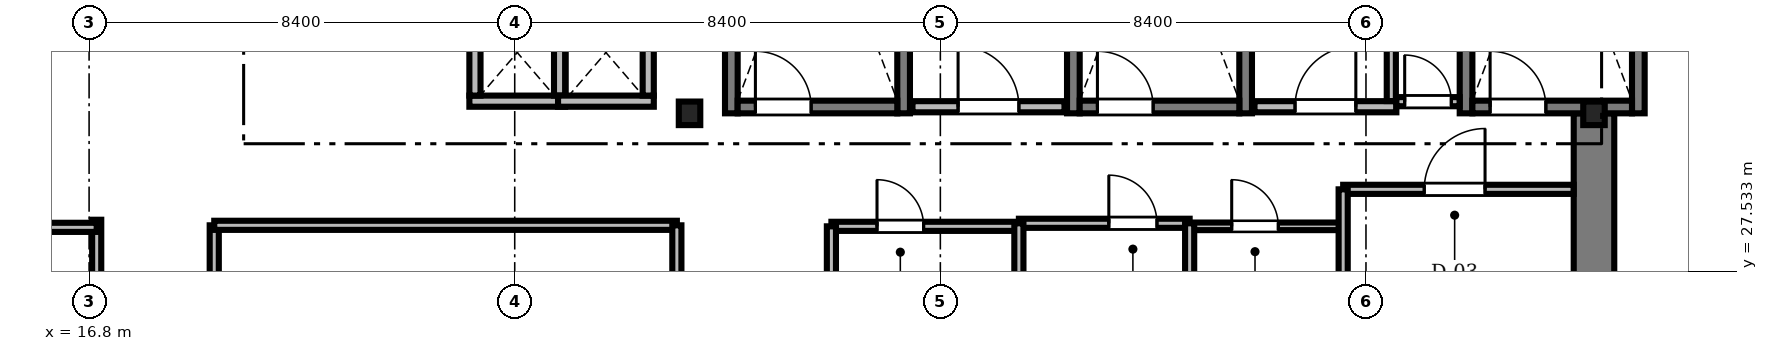
"""IFC4 building model, lengths in metres.
Left out: names, types, materials, properties, quantities, classifications, styles, units other than length and angle.
Written with IfcOpenShell. Run it as: python <this file> out.ifc"""

import sys

from ifc_helpers import new_model, si_unit, direction, frame, frame_2d, origin, origin_2d, place, context, subcontext, project, spatial, rectangle, i_section, extrude, source, transform, mapped, element, fill, save


model = new_model("IFC4")
c1 = context("Model", 3, precision=1e-05, world=origin(), true_north=direction((0.0, 1.0)))
c2 = subcontext(c1, "Body", "Model", "MODEL_VIEW")
j1 = project(units=[si_unit("LENGTHUNIT", "METRE"), si_unit("PLANEANGLEUNIT", "RADIAN")], contexts=[c1])
p1 = place(None, origin())
s1 = spatial("IfcSite", under=j1, at=p1, CompositionType="ELEMENT")
p2 = place(p1, origin())
s2 = spatial("IfcBuilding", under=s1, at=p2, CompositionType="ELEMENT")
p3 = place(p2, frame((0.0, 0.0, 159.4)))
s3 = spatial("IfcBuildingStorey", under=s2, at=p3, CompositionType="ELEMENT", Elevation=159.4)
m1 = source(origin(), c2, "Body", "SweptSolid", [
    extrude(rectangle(XDim=13.15, YDim=0.8, at=frame_2d((6.575, 0.0))), origin(), (0.0, 0.0, 1.0), 3.46),
])
p4 = place(p3, frame((46.5, 17.5, 0.0), z_axis=(0.0, 0.0, 1.0), x_axis=(0.0, 1.0, 0.0)))
e1 = element("IfcWall", 1, at=p4, inside=s3, PredefinedType="SHEAR", context=c2, shape_type="MappedRepresentation", body=[
    mapped(m1, transform((0.0, 0.0, 0.0), scale=1.0)),
])
m2 = source(origin(), c2, "Body", "SweptSolid", [
    extrude(i_section(OverallWidth=0.424, OverallDepth=0.465, WebThickness=0.035, FlangeThickness=0.056, FilletRadius=0.015, at=origin_2d()), origin(), (0.0, 0.0, 1.0), 3.46),
])
for number, where, z_axis, x_axis in (
    (2, (28.65, 30.65, 0.0), (0.0, 0.0, 1.0), (1.0, 0.0, 0.0)),
    (3, (46.5, 30.65, 0.0), (0.0, 0.0, 1.0), (1.0, 0.0, 0.0)),
):
    element("IfcColumn", number, at=place(p3, frame(where, z_axis=z_axis, x_axis=x_axis)), inside=s3, PredefinedType="COLUMN", context=c2, shape_type="MappedRepresentation", body=[
        mapped(m2, transform((0.0, 0.0, 0.0), scale=1.0)),
    ])
m3 = source(origin(), c2, "Body", "SweptSolid", [
    extrude(rectangle(XDim=9.25, YDim=0.25, at=frame_2d((4.625, 0.0))), origin(), (0.0, 0.0, 1.0), 3.5),
])
for number, where, z_axis, x_axis in (
    (4, (29.475, 30.65, 0.0), (0.0, 0.0, 1.0), (0.0, 1.0, 0.0)),
    (5, (32.875, 30.65, 0.0), (0.0, 0.0, 1.0), (0.0, 1.0, 0.0)),
):
    element("IfcWall", number, at=place(p3, frame(where, z_axis=z_axis, x_axis=x_axis)), inside=s3, PredefinedType="SOLIDWALL", context=c2, shape_type="MappedRepresentation", body=[
        mapped(m3, transform((0.0, 0.0, 0.0), scale=1.0)),
    ])
m4 = source(origin(), c2, "Body", "SweptSolid", [
    extrude(rectangle(XDim=3.15, YDim=0.25, at=frame_2d((1.575, 0.0))), origin(), (0.0, 0.0, 1.0), 3.5),
])
p5 = place(p3, frame((29.6, 30.775, 0.0), z_axis=(0.0, 0.0, 1.0), x_axis=(1.0, 0.0, 0.0)))
e6 = element("IfcWall", 6, at=p5, inside=s3, PredefinedType="SOLIDWALL", context=c2, shape_type="MappedRepresentation", body=[
    mapped(m4, transform((0.0, 0.0, 0.0), scale=1.0)),
])
m5 = source(origin(), c2, "Body", "SweptSolid", [
    extrude(rectangle(XDim=1.1, YDim=2.2, at=frame_2d((0.55, 1.1))), frame((0.0, 0.135, 0.0), z_axis=(0.0, -1.0, 0.0), x_axis=(1.0, 0.0, 0.0)), (0.0, 0.0, 1.0), 0.27),
])
p6 = place(p5, frame((0.35, 0.0, 0.0)))
e7 = element("IfcOpeningElement", 7, at=p6, cuts=e6, PredefinedType="OPENING", context=c2, shape_type="MappedRepresentation", body=[
    mapped(m5, transform((0.0, 0.0, 0.0), scale=1.0)),
])
for number, where, z_axis, x_axis in (
    (8, (36.225, 30.65, 0.0), (0.0, 0.0, 1.0), (0.0, 1.0, 0.0)),
    (9, (39.625, 30.65, 0.0), (0.0, 0.0, 1.0), (0.0, 1.0, 0.0)),
):
    element("IfcWall", number, at=place(p3, frame(where, z_axis=z_axis, x_axis=x_axis)), inside=s3, PredefinedType="SOLIDWALL", context=c2, shape_type="MappedRepresentation", body=[
        mapped(m3, transform((0.0, 0.0, 0.0), scale=1.0)),
    ])
p7 = place(p3, frame((36.35, 30.775, 0.0), z_axis=(0.0, 0.0, 1.0), x_axis=(1.0, 0.0, 0.0)))
e10 = element("IfcWall", 10, at=p7, inside=s3, PredefinedType="SOLIDWALL", context=c2, shape_type="MappedRepresentation", body=[
    mapped(m4, transform((0.0, 0.0, 0.0), scale=1.0)),
])
p8 = place(p7, frame((0.35, 0.0, 0.0)))
e11 = element("IfcOpeningElement", 11, at=p8, cuts=e10, PredefinedType="OPENING", context=c2, shape_type="MappedRepresentation", body=[
    mapped(m5, transform((0.0, 0.0, 0.0), scale=1.0)),
])
for number, where, z_axis, x_axis in (
    (12, (43.975, 30.65, 0.0), (0.0, 0.0, 1.0), (0.0, 1.0, 0.0)),
    (13, (47.375, 30.65, 0.0), (0.0, 0.0, 1.0), (0.0, 1.0, 0.0)),
):
    element("IfcWall", number, at=place(p3, frame(where, z_axis=z_axis, x_axis=x_axis)), inside=s3, PredefinedType="SOLIDWALL", context=c2, shape_type="MappedRepresentation", body=[
        mapped(m3, transform((0.0, 0.0, 0.0), scale=1.0)),
    ])
p9 = place(p3, frame((44.1, 30.775, 0.0), z_axis=(0.0, 0.0, 1.0), x_axis=(1.0, 0.0, 0.0)))
e14 = element("IfcWall", 14, at=p9, inside=s3, PredefinedType="SOLIDWALL", context=c2, shape_type="MappedRepresentation", body=[
    mapped(m4, transform((0.0, 0.0, 0.0), scale=1.0)),
])
p10 = place(p9, frame((0.35, 0.0, 0.0)))
e15 = element("IfcOpeningElement", 15, at=p10, cuts=e14, PredefinedType="OPENING", context=c2, shape_type="MappedRepresentation", body=[
    mapped(m5, transform((0.0, 0.0, 0.0), scale=1.0)),
])
m6 = source(origin(), c2, "Body", "SweptSolid", [
    extrude(rectangle(XDim=3.0, YDim=0.22, at=frame_2d((1.5, 0.0))), origin(), (0.0, 0.0, 1.0), 3.46),
])
p11 = place(p3, frame((33.05, 30.78, 0.0), z_axis=(0.0, 0.0, 1.0), x_axis=(1.0, 0.0, 0.0)))
e16 = element("IfcWall", 16, at=p11, inside=s3, PredefinedType="SOLIDWALL", context=c2, shape_type="MappedRepresentation", body=[
    mapped(m6, transform((0.0, 0.0, 0.0), scale=1.0)),
])
m7 = source(origin(), c2, "Body", "SweptSolid", [
    extrude(rectangle(XDim=1.2, YDim=2.2, at=frame_2d((0.6, 1.1))), frame((0.0, 0.12, 0.0), z_axis=(0.0, -1.0, 0.0), x_axis=(1.0, 0.0, 0.0)), (0.0, 0.0, 1.0), 0.24),
])
p12 = place(p11, frame((0.9, 0.0, 0.0)))
e17 = element("IfcOpeningElement", 17, at=p12, cuts=e16, PredefinedType="OPENING", context=c2, shape_type="MappedRepresentation", body=[
    mapped(m7, transform((0.0, 0.0, 0.0), scale=1.0)),
])
m8 = source(origin(), c2, "Body", "SweptSolid", [
    extrude(rectangle(XDim=2.8, YDim=0.22, at=frame_2d((1.4, 0.0))), origin(), (0.0, 0.0, 1.0), 3.46),
])
p13 = place(p3, frame((39.8, 30.78, 0.0), z_axis=(0.0, 0.0, 1.0), x_axis=(1.0, 0.0, 0.0)))
e18 = element("IfcWall", 18, at=p13, inside=s3, PredefinedType="SOLIDWALL", context=c2, shape_type="MappedRepresentation", body=[
    mapped(m8, transform((0.0, 0.0, 0.0), scale=1.0)),
])
p14 = place(p13, frame((0.8, 0.0, 0.0)))
e19 = element("IfcOpeningElement", 19, at=p14, cuts=e18, PredefinedType="OPENING", context=c2, shape_type="MappedRepresentation", body=[
    mapped(m7, transform((0.0, 0.0, 0.0), scale=1.0)),
])
m9 = source(origin(), c2, "Body", "SweptSolid", [
    extrude(rectangle(XDim=1.89, YDim=0.22, at=frame_2d((0.945, 0.0))), origin(), (0.0, 0.0, 1.0), 3.46),
])
p15 = place(p3, frame((24.305, 30.89, 0.0), z_axis=(0.0, 0.0, 1.0), x_axis=(1.0, 0.0, 0.0)))
e20 = element("IfcWall", 20, at=p15, inside=s3, PredefinedType="SOLIDWALL", context=c2, shape_type="MappedRepresentation", body=[
    mapped(m9, transform((0.0, 0.0, 0.0), scale=1.0)),
])
m10 = source(origin(), c2, "Body", "SweptSolid", [
    extrude(rectangle(XDim=1.7, YDim=0.22, at=frame_2d((0.85, 0.0))), origin(), (0.0, 0.0, 1.0), 3.46),
])
for number, where, z_axis, x_axis in (
    (21, (24.415, 31.0, 0.0), (0.0, 0.0, 1.0), (0.0, 1.0, 0.0)),
    (22, (26.085, 31.0, 0.0), (0.0, 0.0, 1.0), (0.0, 1.0, 0.0)),
):
    element("IfcWall", number, at=place(p3, frame(where, z_axis=z_axis, x_axis=x_axis)), inside=s3, PredefinedType="SOLIDWALL", context=c2, shape_type="MappedRepresentation", body=[
        mapped(m10, transform((0.0, 0.0, 0.0), scale=1.0)),
    ])
p16 = place(p3, frame((26.055, 30.89, 0.0), z_axis=(0.0, 0.0, 1.0), x_axis=(1.0, 0.0, 0.0)))
e23 = element("IfcWall", 23, at=p16, inside=s3, PredefinedType="SOLIDWALL", context=c2, shape_type="MappedRepresentation", body=[
    mapped(m9, transform((0.0, 0.0, 0.0), scale=1.0)),
])
p17 = place(p3, frame((27.835, 31.0, 0.0), z_axis=(0.0, 0.0, 1.0), x_axis=(0.0, 1.0, 0.0)))
e24 = element("IfcWall", 24, at=p17, inside=s3, PredefinedType="SOLIDWALL", context=c2, shape_type="MappedRepresentation", body=[
    mapped(m10, transform((0.0, 0.0, 0.0), scale=1.0)),
])
m11 = source(origin(), c2, "Body", "SweptSolid", [
    extrude(rectangle(XDim=4.548, YDim=0.18, at=frame_2d((2.274, 0.0))), origin(), (0.0, 0.0, 1.0), 3.092),
])
p18 = place(p3, frame((41.55, 29.15, 0.0), z_axis=(0.0, 0.0, 1.0), x_axis=(1.0, 0.0, 0.0)))
e25 = element("IfcWall", 25, at=p18, inside=s3, PredefinedType="PARTITIONING", context=c2, shape_type="MappedRepresentation", body=[
    mapped(m11, transform((0.0, 0.0, 0.0), scale=1.0)),
])
m12 = source(origin(), c2, "Body", "SweptSolid", [
    extrude(rectangle(XDim=1.2, YDim=2.2, at=frame_2d((0.6, 1.1))), frame((0.0, 0.1, 0.0), z_axis=(0.0, -1.0, 0.0), x_axis=(1.0, 0.0, 0.0)), (0.0, 0.0, 1.0), 0.2),
])
p19 = place(p18, frame((1.6, 0.0, 0.0)))
e26 = element("IfcOpeningElement", 26, at=p19, cuts=e25, PredefinedType="OPENING", context=c2, shape_type="MappedRepresentation", body=[
    mapped(m12, transform((0.0, 0.0, 0.0), scale=1.0)),
])
m13 = source(origin(), c2, "Body", "SweptSolid", [
    extrude(rectangle(XDim=4.24, YDim=0.18, at=frame_2d((2.12, 0.0))), origin(), (0.0, 0.0, 1.0), 2.852),
])
p20 = place(p3, frame((19.27, 24.2, 0.0), z_axis=(0.0, 0.0, 1.0), x_axis=(0.0, 1.0, 0.0)))
e27 = element("IfcWall", 27, at=p20, inside=s3, PredefinedType="PARTITIONING", context=c2, shape_type="MappedRepresentation", body=[
    mapped(m13, transform((0.0, 0.0, 0.0), scale=1.0)),
])
m14 = source(origin(), c2, "Body", "SweptSolid", [
    extrude(rectangle(XDim=1.05, YDim=2.2, at=frame_2d((0.525, 1.1))), frame((0.0, 0.1, 0.0), z_axis=(0.0, -1.0, 0.0), x_axis=(1.0, 0.0, 0.0)), (0.0, 0.0, 1.0), 0.2),
])
p21 = place(p20, frame((1.4, 0.0, 0.0)))
e28 = element("IfcOpeningElement", 28, at=p21, cuts=e27, PredefinedType="OPENING", context=c2, shape_type="MappedRepresentation", body=[
    mapped(m14, transform((0.0, 0.0, 0.0), scale=1.0)),
])
m15 = source(origin(), c2, "Body", "SweptSolid", [
    extrude(rectangle(XDim=3.7, YDim=0.18, at=frame_2d((1.85, 0.0))), origin(), (0.0, 0.0, 1.0), 3.092),
])
p22 = place(p3, frame((31.45, 28.42, 0.0), z_axis=(0.0, 0.0, 1.0), x_axis=(1.0, 0.0, 0.0)))
e29 = element("IfcWall", 29, at=p22, inside=s3, PredefinedType="PARTITIONING", context=c2, shape_type="MappedRepresentation", body=[
    mapped(m15, transform((0.0, 0.0, 0.0), scale=1.0)),
])
m16 = source(origin(), c2, "Body", "SweptSolid", [
    extrude(rectangle(XDim=0.92, YDim=2.1, at=frame_2d((0.46, 1.05))), frame((0.0, 0.1, 0.0), z_axis=(0.0, -1.0, 0.0), x_axis=(1.0, 0.0, 0.0)), (0.0, 0.0, 1.0), 0.2),
])
p23 = place(p22, frame((0.9, 0.0, 0.0)))
e30 = element("IfcOpeningElement", 30, at=p23, cuts=e29, PredefinedType="OPENING", context=c2, shape_type="MappedRepresentation", body=[
    mapped(m16, transform((0.0, 0.0, 0.0), scale=1.0)),
])
m17 = source(origin(), c2, "Body", "SweptSolid", [
    extrude(rectangle(XDim=3.37, YDim=0.18, at=frame_2d((1.685, 0.0))), origin(), (0.0, 0.0, 1.0), 3.46),
])
p24 = place(p3, frame((35.15, 28.48, 0.0), z_axis=(0.0, 0.0, 1.0), x_axis=(1.0, 0.0, 0.0)))
e31 = element("IfcWall", 31, at=p24, inside=s3, PredefinedType="PARTITIONING", context=c2, shape_type="MappedRepresentation", body=[
    mapped(m17, transform((0.0, 0.0, 0.0), scale=1.0)),
])
m18 = source(origin(), c2, "Body", "SweptSolid", [
    extrude(rectangle(XDim=0.95, YDim=2.15, at=frame_2d((0.475, 1.075))), frame((0.0, 0.1, 0.0), z_axis=(0.0, -1.0, 0.0), x_axis=(1.0, 0.0, 0.0)), (0.0, 0.0, 1.0), 0.2),
])
p25 = place(p24, frame((1.775, 0.0, 0.0)))
e32 = element("IfcOpeningElement", 32, at=p25, cuts=e31, PredefinedType="OPENING", context=c2, shape_type="MappedRepresentation", body=[
    mapped(m18, transform((0.0, 0.0, 0.0), scale=1.0)),
])
m19 = source(origin(), c2, "Body", "SweptSolid", [
    extrude(rectangle(XDim=3.0, YDim=0.15, at=frame_2d((1.5, 0.0))), origin(), (0.0, 0.0, 1.0), 3.46),
])
p26 = place(p3, frame((38.52, 28.42, 0.0), z_axis=(0.0, 0.0, 1.0), x_axis=(1.0, 0.0, 0.0)))
e33 = element("IfcWall", 33, at=p26, inside=s3, PredefinedType="PARTITIONING", context=c2, shape_type="MappedRepresentation", body=[
    mapped(m19, transform((0.0, 0.0, 0.0), scale=1.0)),
])
m20 = source(origin(), c2, "Body", "SweptSolid", [
    extrude(rectangle(XDim=0.92, YDim=2.1, at=frame_2d((0.46, 1.05))), frame((0.0, 0.085, 0.0), z_axis=(0.0, -1.0, 0.0), x_axis=(1.0, 0.0, 0.0)), (0.0, 0.0, 1.0), 0.17),
])
p27 = place(p26, frame((0.83, 0.0, 0.0)))
e34 = element("IfcOpeningElement", 34, at=p27, cuts=e33, PredefinedType="OPENING", context=c2, shape_type="MappedRepresentation", body=[
    mapped(m20, transform((0.0, 0.0, 0.0), scale=1.0)),
])
m21 = source(origin(), c2, "Body", "SweptSolid", [
    extrude(rectangle(XDim=1.248, YDim=0.18, at=frame_2d((0.624, 0.0))), origin(), (0.0, 0.0, 1.0), 3.46),
])
p28 = place(p3, frame((42.6, 30.88, 0.0), z_axis=(0.0, 0.0, 1.0), x_axis=(1.0, 0.0, 0.0)))
e35 = element("IfcWall", 35, at=p28, inside=s3, PredefinedType="PARTITIONING", context=c2, shape_type="MappedRepresentation", body=[
    mapped(m21, transform((0.0, 0.0, 0.0), scale=1.0)),
])
p29 = place(p28, frame((0.164, 0.0, 0.0)))
e36 = element("IfcOpeningElement", 36, at=p29, cuts=e35, PredefinedType="OPENING", context=c2, shape_type="MappedRepresentation", body=[
    mapped(m16, transform((0.0, 0.0, 0.0), scale=1.0)),
])
m22 = source(origin(), c2, "Body", "SweptSolid", [
    extrude(rectangle(XDim=14.2, YDim=0.18, at=frame_2d((7.1, 0.0))), origin(), (0.0, 0.0, 1.0), 2.852),
])
p30 = place(p3, frame((16.95, 14.35, 0.0), z_axis=(0.0, 0.0, 1.0), x_axis=(0.0, 1.0, 0.0)))
e37 = element("IfcWall", 37, at=p30, inside=s3, PredefinedType="PARTITIONING", context=c2, shape_type="MappedRepresentation", body=[
    mapped(m22, transform((0.0, 0.0, 0.0), scale=1.0)),
])
m23 = source(origin(), c2, "Body", "SweptSolid", [
    extrude(rectangle(XDim=10.22, YDim=0.18, at=frame_2d((5.11, 0.0))), origin(), (0.0, 0.0, 1.0), 2.702),
])
p31 = place(p3, frame((6.73, 28.4, 0.0), z_axis=(0.0, 0.0, 1.0), x_axis=(1.0, 0.0, 0.0)))
e38 = element("IfcWall", 38, at=p31, inside=s3, PredefinedType="PARTITIONING", context=c2, shape_type="MappedRepresentation", body=[
    mapped(m23, transform((0.0, 0.0, 0.0), scale=1.0)),
])
m24 = source(origin(), c2, "Body", "SweptSolid", [
    extrude(rectangle(XDim=9.13, YDim=0.18, at=frame_2d((4.565, 0.0))), origin(), (0.0, 0.0, 1.0), 3.46),
])
p32 = place(p3, frame((19.27, 28.44, 0.0), z_axis=(0.0, 0.0, 1.0), x_axis=(1.0, 0.0, 0.0)))
e39 = element("IfcWall", 39, at=p32, inside=s3, PredefinedType="PARTITIONING", context=c2, shape_type="MappedRepresentation", body=[
    mapped(m24, transform((0.0, 0.0, 0.0), scale=1.0)),
])
p33 = place(p3, frame((28.4, 24.2, 0.0), z_axis=(0.0, 0.0, 1.0), x_axis=(0.0, 1.0, 0.0)))
e40 = element("IfcWall", 40, at=p33, inside=s3, PredefinedType="PARTITIONING", context=c2, shape_type="MappedRepresentation", body=[
    mapped(m13, transform((0.0, 0.0, 0.0), scale=1.0)),
])
m25 = source(origin(), c2, "Body", "SweptSolid", [
    extrude(rectangle(XDim=2.35, YDim=0.18, at=frame_2d((1.175, 0.0))), origin(), (0.0, 0.0, 1.0), 2.852),
])
p34 = place(p3, frame((41.55, 26.8, 0.0), z_axis=(0.0, 0.0, 1.0), x_axis=(0.0, 1.0, 0.0)))
e41 = element("IfcWall", 41, at=p34, inside=s3, PredefinedType="PARTITIONING", context=c2, shape_type="MappedRepresentation", body=[
    mapped(m25, transform((0.0, 0.0, 0.0), scale=1.0)),
])
m26 = source(origin(), c2, "Body", "SweptSolid", [
    extrude(rectangle(XDim=1.858, YDim=0.18, at=frame_2d((0.929, 0.0))), origin(), (0.0, 0.0, 1.0), 3.46),
])
p35 = place(p3, frame((42.5, 30.892, 0.0), z_axis=(0.0, 0.0, 1.0), x_axis=(0.0, 1.0, 0.0)))
e42 = element("IfcWall", 42, at=p35, inside=s3, PredefinedType="PARTITIONING", context=c2, shape_type="MappedRepresentation", body=[
    mapped(m26, transform((0.0, 0.0, 0.0), scale=1.0)),
])
m27 = source(origin(), c2, "Body", "SweptSolid", [
    extrude(rectangle(XDim=1.66, YDim=0.18, at=frame_2d((0.83, 0.0))), origin(), (0.0, 0.0, 1.0), 3.002),
])
for number, where, z_axis, x_axis in (
    (43, (35.15, 26.82, 0.0), (0.0, 0.0, 1.0), (0.0, 1.0, 0.0)),
    (44, (38.52, 26.82, 0.0), (0.0, 0.0, 1.0), (0.0, 1.0, 0.0)),
):
    element("IfcWall", number, at=place(p3, frame(where, z_axis=z_axis, x_axis=x_axis)), inside=s3, PredefinedType="PARTITIONING", context=c2, shape_type="MappedRepresentation", body=[
        mapped(m27, transform((0.0, 0.0, 0.0), scale=1.0)),
    ])
m28 = source(origin(), c2, "Body", "SweptSolid", [
    extrude(rectangle(XDim=1.6, YDim=0.18, at=frame_2d((0.8, 0.0))), origin(), (0.0, 0.0, 1.0), 3.002),
])
p36 = place(p3, frame((31.45, 26.82, 0.0), z_axis=(0.0, 0.0, 1.0), x_axis=(0.0, 1.0, 0.0)))
e45 = element("IfcWall", 45, at=p36, inside=s3, PredefinedType="PARTITIONING", context=c2, shape_type="MappedRepresentation", body=[
    mapped(m28, transform((0.0, 0.0, 0.0), scale=1.0)),
])
m29 = source(origin(), c2, "Body", "SweptSolid", [
    extrude(rectangle(XDim=1.1, YDim=2.2, at=frame_2d((0.55, 1.1))), frame((0.0, 0.025, 0.0), z_axis=(0.0, -1.0, 0.0), x_axis=(1.0, 0.0, 0.0)), (0.0, 0.0, 1.0), 0.05),
])
p37 = place(p6, origin())
e46 = element("IfcDoor", 46, at=p37, inside=s3, OperationType="SINGLE_SWING_LEFT", PredefinedType="DOOR", context=c2, shape_type="MappedRepresentation", body=[
    mapped(m29, transform((0.0, 0.0, 0.0), scale=1.0)),
])
fill(e7, e46)
p38 = place(p8, origin())
e47 = element("IfcDoor", 47, at=p38, inside=s3, OperationType="SINGLE_SWING_LEFT", PredefinedType="DOOR", context=c2, shape_type="MappedRepresentation", body=[
    mapped(m29, transform((0.0, 0.0, 0.0), scale=1.0)),
])
fill(e11, e47)
p39 = place(p10, origin())
e48 = element("IfcDoor", 48, at=p39, inside=s3, OperationType="SINGLE_SWING_LEFT", PredefinedType="DOOR", context=c2, shape_type="MappedRepresentation", body=[
    mapped(m29, transform((0.0, 0.0, 0.0), scale=1.0)),
])
fill(e15, e48)
m30 = source(origin(), c2, "Body", "SweptSolid", [
    extrude(rectangle(XDim=1.2, YDim=2.2, at=frame_2d((0.6, 1.1))), frame((0.0, 0.025, 0.0), z_axis=(0.0, -1.0, 0.0), x_axis=(1.0, 0.0, 0.0)), (0.0, 0.0, 1.0), 0.05),
])
p40 = place(p12, origin())
e49 = element("IfcDoor", 49, at=p40, inside=s3, OperationType="SINGLE_SWING_LEFT", PredefinedType="DOOR", context=c2, shape_type="MappedRepresentation", body=[
    mapped(m30, transform((0.0, 0.0, 0.0), scale=1.0)),
])
fill(e17, e49)
p41 = place(p14, origin())
e50 = element("IfcDoor", 50, at=p41, inside=s3, OperationType="SINGLE_SWING_RIGHT", PredefinedType="DOOR", context=c2, shape_type="MappedRepresentation", body=[
    mapped(m30, transform((0.0, 0.0, 0.0), scale=1.0)),
])
fill(e19, e50)
p42 = place(p19, origin())
e51 = element("IfcDoor", 51, at=p42, inside=s3, OperationType="SINGLE_SWING_RIGHT", PredefinedType="DOOR", context=c2, shape_type="MappedRepresentation", body=[
    mapped(m30, transform((0.0, 0.0, 0.0), scale=1.0)),
])
fill(e26, e51)
m31 = source(origin(), c2, "Body", "SweptSolid", [
    extrude(rectangle(XDim=0.92, YDim=2.1, at=frame_2d((0.46, 1.05))), frame((0.0, 0.025, 0.0), z_axis=(0.0, -1.0, 0.0), x_axis=(1.0, 0.0, 0.0)), (0.0, 0.0, 1.0), 0.05),
])
p43 = place(p23, origin())
e52 = element("IfcDoor", 52, at=p43, inside=s3, OperationType="SINGLE_SWING_LEFT", PredefinedType="DOOR", context=c2, shape_type="MappedRepresentation", body=[
    mapped(m31, transform((0.0, 0.0, 0.0), scale=1.0)),
])
fill(e30, e52)
m32 = source(origin(), c2, "Body", "SweptSolid", [
    extrude(rectangle(XDim=0.95, YDim=2.15, at=frame_2d((0.475, 1.075))), frame((0.0, 0.025, 0.0), z_axis=(0.0, -1.0, 0.0), x_axis=(1.0, 0.0, 0.0)), (0.0, 0.0, 1.0), 0.05),
])
p44 = place(p25, origin())
e53 = element("IfcDoor", 53, at=p44, inside=s3, OperationType="SINGLE_SWING_LEFT", PredefinedType="DOOR", context=c2, shape_type="MappedRepresentation", body=[
    mapped(m32, transform((0.0, 0.0, 0.0), scale=1.0)),
])
fill(e32, e53)
p45 = place(p27, origin())
e54 = element("IfcDoor", 54, at=p45, inside=s3, OperationType="SINGLE_SWING_LEFT", PredefinedType="DOOR", context=c2, shape_type="MappedRepresentation", body=[
    mapped(m31, transform((0.0, 0.0, 0.0), scale=1.0)),
])
fill(e34, e54)
p46 = place(p29, origin())
e55 = element("IfcDoor", 55, at=p46, inside=s3, OperationType="SINGLE_SWING_LEFT", PredefinedType="DOOR", context=c2, shape_type="MappedRepresentation", body=[
    mapped(m31, transform((0.0, 0.0, 0.0), scale=1.0)),
])
fill(e36, e55)
save(model, sys.argv[1])
